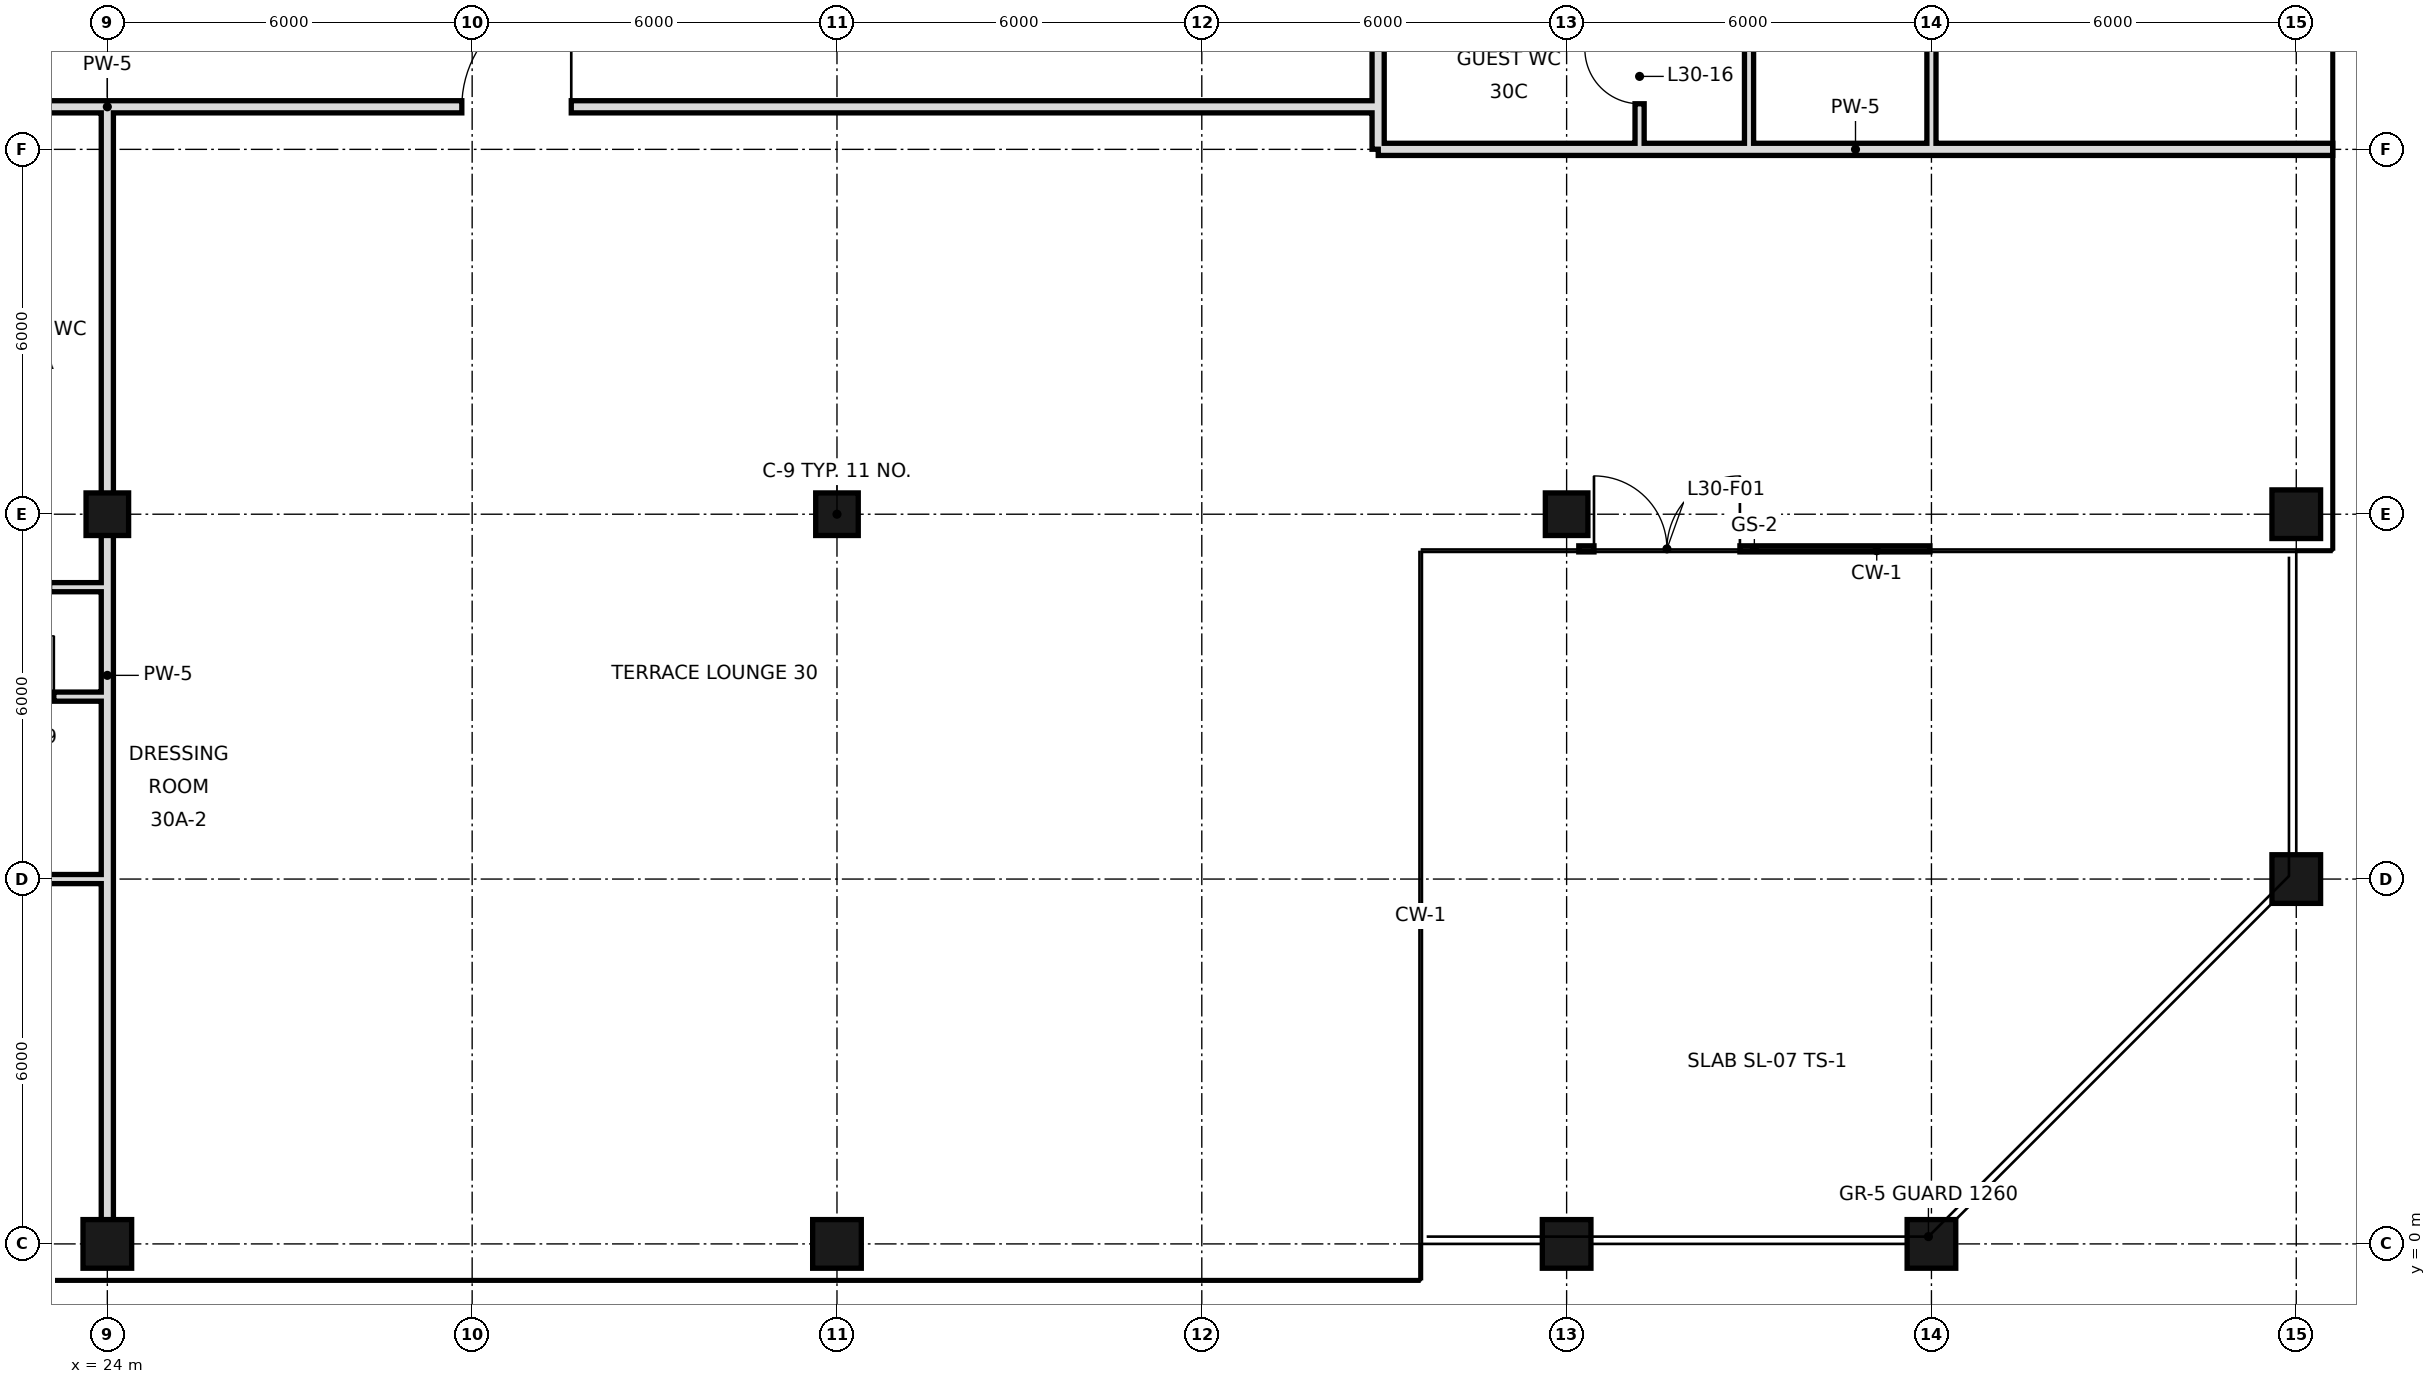
"""IFC4 building model, lengths in metres.
Left out: names, types, materials, properties, quantities, classifications, styles, units other than length and angle.
Written with IfcOpenShell. Run it as: python <this file> out.ifc"""

import sys

from ifc_helpers import new_model, si_unit, direction, frame, frame_2d, origin, origin_2d, place, context, subcontext, project, spatial, rectangle, hollow_rectangle, extrude, element, fill, save


model = new_model("IFC4")
c1 = context("Model", 3, precision=1e-05, world=origin(), true_north=direction((0.0, 1.0)))
c2 = subcontext(c1, "Body", "Model", "MODEL_VIEW")
j1 = project(units=[si_unit("LENGTHUNIT", "METRE"), si_unit("PLANEANGLEUNIT", "RADIAN")], contexts=[c1])
p1 = place(None, origin())
s1 = spatial("IfcSite", under=j1, at=p1, CompositionType="ELEMENT")
p2 = place(p1, origin())
s2 = spatial("IfcBuilding", under=s1, at=p2, CompositionType="ELEMENT")
p3 = place(p2, frame((0.0, 0.0, 134.0)))
s3 = spatial("IfcBuildingStorey", under=s2, at=p3, CompositionType="ELEMENT", Elevation=134.0)
p4 = place(p3, frame((24.0, 0.0, 0.0), z_axis=(0.0, 0.0, 1.0), x_axis=(1.0, 0.0, 0.0)))
e1 = element("IfcColumn", 1, at=p4, inside=s3, PredefinedType="COLUMN", context=c2, shape_type="SweptSolid", body=[
    extrude(hollow_rectangle(XDim=0.8, YDim=0.8, WallThickness=0.04, at=origin_2d()), origin(), (0.0, 0.0, 1.0), 4.4),
])
p5 = place(p3, frame((24.0, 12.0, 0.0), z_axis=(0.0, 0.0, 1.0), x_axis=(1.0, 0.0, 0.0)))
e2 = element("IfcColumn", 2, at=p5, inside=s3, PredefinedType="COLUMN", context=c2, shape_type="SweptSolid", body=[
    extrude(hollow_rectangle(XDim=0.7, YDim=0.7, WallThickness=0.036, at=origin_2d()), origin(), (0.0, 0.0, 1.0), 4.4),
])
p6 = place(p3, frame((36.0, 0.0, 0.0), z_axis=(0.0, 0.0, 1.0), x_axis=(1.0, 0.0, 0.0)))
e3 = element("IfcColumn", 3, at=p6, inside=s3, PredefinedType="COLUMN", context=c2, shape_type="SweptSolid", body=[
    extrude(hollow_rectangle(XDim=0.8, YDim=0.8, WallThickness=0.04, at=origin_2d()), origin(), (0.0, 0.0, 1.0), 4.4),
])
p7 = place(p3, frame((36.0, 12.0, 0.0), z_axis=(0.0, 0.0, 1.0), x_axis=(1.0, 0.0, 0.0)))
e4 = element("IfcColumn", 4, at=p7, inside=s3, PredefinedType="COLUMN", context=c2, shape_type="SweptSolid", body=[
    extrude(hollow_rectangle(XDim=0.7, YDim=0.7, WallThickness=0.036, at=origin_2d()), origin(), (0.0, 0.0, 1.0), 4.4),
])
p8 = place(p3, frame((48.0, 0.0, 0.0), z_axis=(0.0, 0.0, 1.0), x_axis=(1.0, 0.0, 0.0)))
e5 = element("IfcColumn", 5, at=p8, inside=s3, PredefinedType="COLUMN", context=c2, shape_type="SweptSolid", body=[
    extrude(hollow_rectangle(XDim=0.8, YDim=0.8, WallThickness=0.04, at=origin_2d()), origin(), (0.0, 0.0, 1.0), 4.4),
])
p9 = place(p3, frame((48.0, 12.0, 0.0), z_axis=(0.0, 0.0, 1.0), x_axis=(1.0, 0.0, 0.0)))
e6 = element("IfcColumn", 6, at=p9, inside=s3, PredefinedType="COLUMN", context=c2, shape_type="SweptSolid", body=[
    extrude(hollow_rectangle(XDim=0.7, YDim=0.7, WallThickness=0.036, at=origin_2d()), origin(), (0.0, 0.0, 1.0), 4.4),
])
for number, where, z_axis, x_axis in (
    (7, (54.0, 0.0, 0.0), (0.0, 0.0, 1.0), (1.0, 0.0, 0.0)),
    (8, (60.0, 6.0, 0.0), (0.0, 0.0, 1.0), (1.0, 0.0, 0.0)),
    (9, (60.0, 12.0, 0.0), (0.0, 0.0, 1.0), (1.0, 0.0, 0.0)),
):
    element("IfcColumn", number, at=place(p3, frame(where, z_axis=z_axis, x_axis=x_axis)), inside=s3, PredefinedType="COLUMN", context=c2, shape_type="SweptSolid", body=[
        extrude(hollow_rectangle(XDim=0.8, YDim=0.8, WallThickness=0.04, at=origin_2d()), origin(), (0.0, 0.0, 1.0), 4.4),
    ])
p10 = place(p3, frame((48.2, 11.43, 0.0), z_axis=(0.0, 0.0, 1.0), x_axis=(1.0, 0.0, 0.0)))
e10 = element("IfcWall", 10, at=p10, inside=s3, PredefinedType="SOLIDWALL", context=c2, shape_type="SweptSolid", body=[
    extrude(rectangle(XDim=5.775, YDim=0.1, at=frame_2d((2.888, 0.0))), origin(), (0.0, 0.0, 1.0), 4.1),
])
p11 = place(p10, frame((0.25, 0.0, 0.0)))
e11 = element("IfcOpeningElement", 11, at=p11, cuts=e10, PredefinedType="OPENING", context=c2, shape_type="SweptSolid", body=[
    extrude(rectangle(XDim=2.4, YDim=2.4, at=frame_2d((1.2, 1.2))), frame((0.0, 0.06, 0.0), z_axis=(0.0, -1.0, 0.0), x_axis=(1.0, 0.0, 0.0)), (0.0, 0.0, 1.0), 0.12),
])
p12 = place(p3, frame((24.0, 0.0, 0.0), z_axis=(0.0, 0.0, 1.0), x_axis=(0.0, 1.0, 0.0)))
e12 = element("IfcWall", 12, at=p12, inside=s3, PredefinedType="SOLIDWALL", context=c2, shape_type="SweptSolid", body=[
    extrude(rectangle(XDim=18.7, YDim=0.2, at=frame_2d((9.35, 0.0))), origin(), (0.0, 0.0, 1.0), 3.4),
])
p13 = place(p3, frame((44.9, 18.002, 0.0), z_axis=(0.0, 0.0, 1.0), x_axis=(0.0, 1.0, 0.0)))
e13 = element("IfcWall", 13, at=p13, inside=s3, PredefinedType="SOLIDWALL", context=c2, shape_type="SweptSolid", body=[
    extrude(rectangle(XDim=2.398, YDim=0.2, at=frame_2d((1.199, 0.0))), origin(), (0.0, 0.0, 1.0), 4.1),
])
p14 = place(p3, frame((49.2, 18.0, 0.0), z_axis=(0.0, 0.0, 1.0), x_axis=(0.0, 1.0, 0.0)))
e14 = element("IfcWall", 14, at=p14, inside=s3, PredefinedType="PARTITIONING", context=c2, shape_type="SweptSolid", body=[
    extrude(rectangle(XDim=2.4, YDim=0.15, at=frame_2d((1.2, 0.0))), origin(), (0.0, 0.0, 1.0), 4.1),
])
p15 = place(p14, frame((0.75, 0.0, 0.0)))
e15 = element("IfcOpeningElement", 15, at=p15, cuts=e14, PredefinedType="OPENING", context=c2, shape_type="SweptSolid", body=[
    extrude(rectangle(XDim=0.9, YDim=2.4, at=frame_2d((0.45, 1.2))), frame((0.0, 0.085, 0.0), z_axis=(0.0, -1.0, 0.0), x_axis=(1.0, 0.0, 0.0)), (0.0, 0.0, 1.0), 0.17),
])
p16 = place(p3, frame((51.0, 18.0, 0.0), z_axis=(0.0, 0.0, 1.0), x_axis=(0.0, 1.0, 0.0)))
e16 = element("IfcWall", 16, at=p16, inside=s3, PredefinedType="PARTITIONING", context=c2, shape_type="SweptSolid", body=[
    extrude(rectangle(XDim=18.0, YDim=0.15, at=frame_2d((9.0, 0.0))), origin(), (0.0, 0.0, 1.0), 4.1),
])
p17 = place(p16, frame((3.16, 0.0, 0.0)))
e17 = element("IfcOpeningElement", 17, at=p17, cuts=e16, PredefinedType="OPENING", context=c2, shape_type="SweptSolid", body=[
    extrude(rectangle(XDim=1.8, YDim=2.4, at=frame_2d((0.9, 1.2))), frame((0.0, 0.085, 0.0), z_axis=(0.0, -1.0, 0.0), x_axis=(1.0, 0.0, 0.0)), (0.0, 0.0, 1.0), 0.17),
])
p18 = place(p16, frame((13.6, 0.0, 0.0)))
e18 = element("IfcOpeningElement", 18, at=p18, cuts=e16, PredefinedType="OPENING", context=c2, shape_type="SweptSolid", body=[
    extrude(rectangle(XDim=1.0, YDim=2.4, at=frame_2d((0.5, 1.2))), frame((0.0, 0.085, 0.0), z_axis=(0.0, -1.0, 0.0), x_axis=(1.0, 0.0, 0.0)), (0.0, 0.0, 1.0), 0.17),
])
p19 = place(p3, frame((54.0, 18.0, 0.0), z_axis=(0.0, 0.0, 1.0), x_axis=(0.0, 1.0, 0.0)))
e19 = element("IfcWall", 19, at=p19, inside=s3, PredefinedType="PARTITIONING", context=c2, shape_type="SweptSolid", body=[
    extrude(rectangle(XDim=12.0, YDim=0.15, at=frame_2d((6.0, 0.0))), origin(), (0.0, 0.0, 1.0), 4.1),
])
p20 = place(p19, frame((7.04, 0.0, 0.0)))
e20 = element("IfcOpeningElement", 20, at=p20, cuts=e19, PredefinedType="OPENING", context=c2, shape_type="SweptSolid", body=[
    extrude(rectangle(XDim=1.8, YDim=2.4, at=frame_2d((0.9, 1.2))), frame((0.0, 0.085, 0.0), z_axis=(0.0, -1.0, 0.0), x_axis=(1.0, 0.0, 0.0)), (0.0, 0.0, 1.0), 0.17),
])
p21 = place(p3, frame((21.6, 10.8, 0.0), z_axis=(0.0, 0.0, 1.0), x_axis=(1.0, 0.0, 0.0)))
e21 = element("IfcWall", 21, at=p21, inside=s3, PredefinedType="PARTITIONING", context=c2, shape_type="SweptSolid", body=[
    extrude(rectangle(XDim=2.4, YDim=0.15, at=frame_2d((1.2, 0.0))), origin(), (0.0, 0.0, 1.0), 4.1),
])
p22 = place(p21, frame((0.55, 0.0, 0.0)))
e22 = element("IfcOpeningElement", 22, at=p22, cuts=e21, PredefinedType="OPENING", context=c2, shape_type="SweptSolid", body=[
    extrude(rectangle(XDim=0.9, YDim=2.4, at=frame_2d((0.45, 1.2))), frame((0.0, 0.085, 0.0), z_axis=(0.0, -1.0, 0.0), x_axis=(1.0, 0.0, 0.0)), (0.0, 0.0, 1.0), 0.17),
])
p23 = place(p3, frame((44.902, 18.0, 0.0), z_axis=(0.0, 0.0, 1.0), x_axis=(1.0, 0.0, 0.0)))
e23 = element("IfcWall", 23, at=p23, inside=s3, PredefinedType="SOLIDWALL", context=c2, shape_type="SweptSolid", body=[
    extrude(rectangle(XDim=15.698, YDim=0.2, at=frame_2d((7.849, 0.0))), origin(), (0.0, 0.0, 1.0), 3.4),
])
p24 = place(p3, frame((3.1, 18.7, 0.0), z_axis=(0.0, 0.0, 1.0), x_axis=(1.0, 0.0, 0.0)))
e24 = element("IfcWall", 24, at=p24, inside=s3, PredefinedType="SOLIDWALL", context=c2, shape_type="SweptSolid", body=[
    extrude(rectangle(XDim=41.8, YDim=0.2, at=frame_2d((20.9, 0.0))), origin(), (0.0, 0.0, 1.0), 3.4),
])
p25 = place(p24, frame((14.04, 0.0, 0.0)))
e25 = element("IfcOpeningElement", 25, at=p25, cuts=e24, PredefinedType="OPENING", context=c2, shape_type="SweptSolid", body=[
    extrude(rectangle(XDim=1.2, YDim=2.4, at=frame_2d((0.6, 1.2))), frame((0.0, 0.11, 0.0), z_axis=(0.0, -1.0, 0.0), x_axis=(1.0, 0.0, 0.0)), (0.0, 0.0, 1.0), 0.22),
])
p26 = place(p24, frame((26.73, 0.0, 0.0)))
e26 = element("IfcOpeningElement", 26, at=p26, cuts=e24, PredefinedType="OPENING", context=c2, shape_type="SweptSolid", body=[
    extrude(rectangle(XDim=1.8, YDim=2.4, at=frame_2d((0.9, 1.2))), frame((0.0, 0.11, 0.0), z_axis=(0.0, -1.0, 0.0), x_axis=(1.0, 0.0, 0.0)), (0.0, 0.0, 1.0), 0.22),
])
p27 = place(p3, frame((21.6, 6.0, 0.0), z_axis=(0.0, 0.0, 1.0), x_axis=(1.0, 0.0, 0.0)))
e27 = element("IfcWall", 27, at=p27, inside=s3, PredefinedType="PARTITIONING", context=c2, shape_type="SweptSolid", body=[
    extrude(rectangle(XDim=2.4, YDim=0.15, at=frame_2d((1.2, 0.0))), origin(), (0.0, 0.0, 1.0), 3.65),
])
p28 = place(p27, frame((0.25, 0.0, 0.0)))
e28 = element("IfcOpeningElement", 28, at=p28, cuts=e27, PredefinedType="OPENING", context=c2, shape_type="SweptSolid", body=[
    extrude(rectangle(XDim=1.0, YDim=2.4, at=frame_2d((0.5, 1.2))), frame((0.0, 0.085, 0.0), z_axis=(0.0, -1.0, 0.0), x_axis=(1.0, 0.0, 0.0)), (0.0, 0.0, 1.0), 0.17),
])
p29 = place(p3, frame((21.6, 9.0, 0.0), z_axis=(0.0, 0.0, 1.0), x_axis=(1.0, 0.0, 0.0)))
e29 = element("IfcWall", 29, at=p29, inside=s3, PredefinedType="PARTITIONING", context=c2, shape_type="SweptSolid", body=[
    extrude(rectangle(XDim=2.4, YDim=0.15, at=frame_2d((1.2, 0.0))), origin(), (0.0, 0.0, 1.0), 4.1),
])
p30 = place(p29, frame((0.52, 0.0, 0.0)))
e30 = element("IfcOpeningElement", 30, at=p30, cuts=e29, PredefinedType="OPENING", context=c2, shape_type="SweptSolid", body=[
    extrude(rectangle(XDim=1.0, YDim=2.4, at=frame_2d((0.5, 1.2))), frame((0.0, 0.085, 0.0), z_axis=(0.0, -1.0, 0.0), x_axis=(1.0, 0.0, 0.0)), (0.0, 0.0, 1.0), 0.17),
])
p31 = place(p11, origin())
e31 = element("IfcDoor", 31, at=p31, inside=s3, OperationType="DOUBLE_DOOR_SINGLE_SWING", PredefinedType="DOOR", context=c2, shape_type="SweptSolid", body=[
    extrude(rectangle(XDim=2.4, YDim=2.4, at=frame_2d((1.2, 1.2))), frame((0.0, 0.025, 0.0), z_axis=(0.0, -1.0, 0.0), x_axis=(1.0, 0.0, 0.0)), (0.0, 0.0, 1.0), 0.05),
])
fill(e11, e31)
p32 = place(p30, frame((1.0, 0.0, 0.0), z_axis=(0.0, 0.0, 1.0), x_axis=(-1.0, 0.0, 0.0)))
e32 = element("IfcDoor", 32, at=p32, inside=s3, OperationType="SINGLE_SWING_LEFT", PredefinedType="DOOR", context=c2, shape_type="SweptSolid", body=[
    extrude(rectangle(XDim=1.0, YDim=2.4, at=frame_2d((0.5, 1.2))), frame((0.0, 0.025, 0.0), z_axis=(0.0, -1.0, 0.0), x_axis=(1.0, 0.0, 0.0)), (0.0, 0.0, 1.0), 0.05),
])
fill(e30, e32)
p33 = place(p15, frame((0.9, 0.0, 0.0), z_axis=(0.0, 0.0, 1.0), x_axis=(-1.0, 0.0, 0.0)))
e33 = element("IfcDoor", 33, at=p33, inside=s3, OperationType="SINGLE_SWING_LEFT", PredefinedType="DOOR", context=c2, shape_type="SweptSolid", body=[
    extrude(rectangle(XDim=0.9, YDim=2.4, at=frame_2d((0.45, 1.2))), frame((0.0, 0.025, 0.0), z_axis=(0.0, -1.0, 0.0), x_axis=(1.0, 0.0, 0.0)), (0.0, 0.0, 1.0), 0.05),
])
fill(e15, e33)
p34 = place(p26, frame((1.8, 0.0, 0.0), z_axis=(0.0, 0.0, 1.0), x_axis=(-1.0, 0.0, 0.0)))
e34 = element("IfcDoor", 34, at=p34, inside=s3, OperationType="SINGLE_SWING_LEFT", PredefinedType="DOOR", context=c2, shape_type="SweptSolid", body=[
    extrude(rectangle(XDim=1.8, YDim=2.4, at=frame_2d((0.9, 1.2))), frame((0.0, 0.025, 0.0), z_axis=(0.0, -1.0, 0.0), x_axis=(1.0, 0.0, 0.0)), (0.0, 0.0, 1.0), 0.05),
])
fill(e26, e34)
save(model, sys.argv[1])
